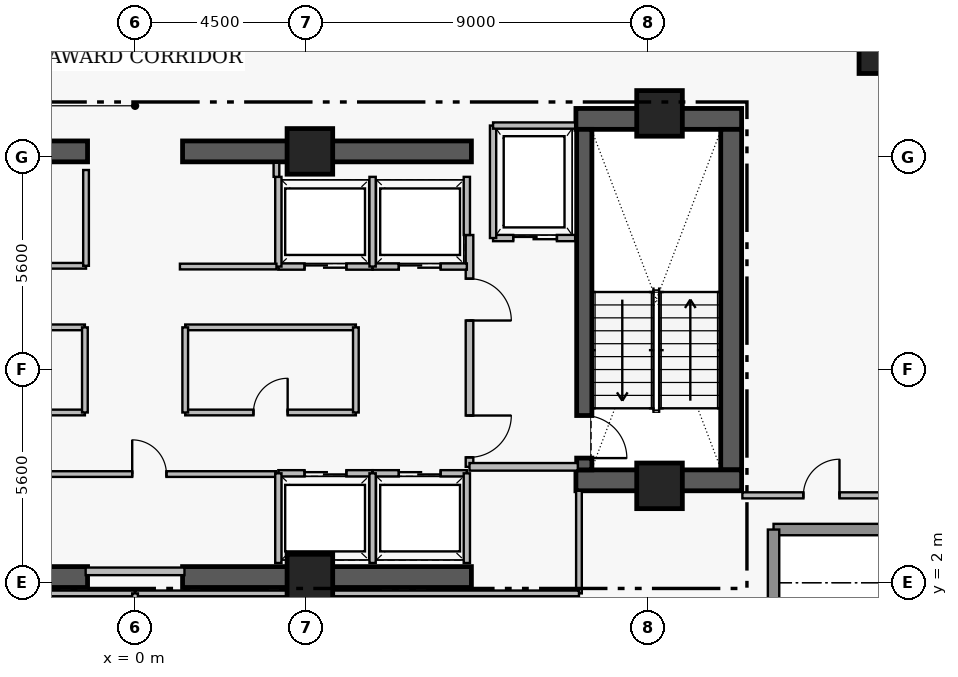
"""IFC4 building model, lengths in metres.
Left out: names, types, materials, properties, quantities, classifications, styles, units other than length and angle.
Written with IfcOpenShell. Run it as: python <this file> out.ifc"""

import sys

from ifc_helpers import new_model, si_unit, direction, frame, frame_2d, origin, origin_2d, place, context, subcontext, project, spatial, rectangle, extrude, element, fill, save


model = new_model("IFC4")
c1 = context("Model", 3, precision=1e-05, world=origin(), true_north=direction((0.0, 1.0)))
c2 = subcontext(c1, "Body", "Model", "MODEL_VIEW")
j1 = project(units=[si_unit("LENGTHUNIT", "METRE"), si_unit("PLANEANGLEUNIT", "RADIAN")], contexts=[c1])
p1 = place(None, origin())
s1 = spatial("IfcSite", under=j1, at=p1, CompositionType="ELEMENT")
p2 = place(p1, origin())
s2 = spatial("IfcBuilding", under=s1, at=p2, CompositionType="ELEMENT")
p3 = place(p2, frame((0.0, 0.0, 265.55)))
s3 = spatial("IfcBuildingStorey", under=s2, at=p3, CompositionType="ELEMENT", Elevation=265.55)
p4 = place(p3, frame((11.6, 14.205, 0.0), z_axis=(0.0, 0.0, 1.0), x_axis=(1.0, 0.0, 0.0)))
e1 = element("IfcWall", 1, at=p4, inside=s3, PredefinedType="SHEAR", context=c2, shape_type="SweptSolid", body=[
    extrude(rectangle(XDim=4.36, YDim=0.55, at=frame_2d((2.18, 0.0))), origin(), (0.0, 0.0, 1.0), 3.51),
])
p5 = place(p3, frame((15.685, 4.97, 0.0), z_axis=(0.0, 0.0, 1.0), x_axis=(0.0, 1.0, 0.0)))
e2 = element("IfcWall", 2, at=p5, inside=s3, PredefinedType="SHEAR", context=c2, shape_type="SweptSolid", body=[
    extrude(rectangle(XDim=8.96, YDim=0.55, at=frame_2d((4.48, 0.0))), origin(), (0.0, 0.0, 1.0), 3.51),
])
p6 = place(p3, frame((11.6, 4.695, 0.0), z_axis=(0.0, 0.0, 1.0), x_axis=(1.0, 0.0, 0.0)))
e3 = element("IfcWall", 3, at=p6, inside=s3, PredefinedType="SHEAR", context=c2, shape_type="SweptSolid", body=[
    extrude(rectangle(XDim=4.36, YDim=0.55, at=frame_2d((2.18, 0.0))), origin(), (0.0, 0.0, 1.0), 3.51),
])
for number, where, z_axis, x_axis in (
    (4, (-8.85, 2.15, 0.0), (0.0, 0.0, 1.0), (1.0, 0.0, 0.0)),
    (5, (1.25, 2.15, 0.0), (0.0, 0.0, 1.0), (1.0, 0.0, 0.0)),
    (6, (-8.85, 13.35, 0.0), (0.0, 0.0, 1.0), (1.0, 0.0, 0.0)),
    (7, (1.25, 13.35, 0.0), (0.0, 0.0, 1.0), (1.0, 0.0, 0.0)),
):
    element("IfcWall", number, at=place(p3, frame(where, z_axis=z_axis, x_axis=x_axis)), inside=s3, PredefinedType="SHEAR", context=c2, shape_type="SweptSolid", body=[
        extrude(rectangle(XDim=7.6, YDim=0.55, at=frame_2d((3.8, 0.0))), origin(), (0.0, 0.0, 1.0), 3.48),
    ])
p7 = place(p3, frame((11.82, 13.93, 0.0), z_axis=(0.0, 0.0, 1.0), x_axis=(0.0, -1.0, 0.0)))
e8 = element("IfcWall", 8, at=p7, inside=s3, PredefinedType="SHEAR", context=c2, shape_type="SweptSolid", body=[
    extrude(rectangle(XDim=8.96, YDim=0.4, at=frame_2d((4.48, 0.0))), origin(), (0.0, 0.0, 1.0), 3.51),
])
p8 = place(p7, frame((7.53, 0.0, 0.0)))
e9 = element("IfcOpeningElement", 9, at=p8, cuts=e8, PredefinedType="OPENING", context=c2, shape_type="SweptSolid", body=[
    extrude(rectangle(XDim=1.12, YDim=2.22, at=frame_2d((0.56, 1.11))), frame((0.0, 0.21, 0.0), z_axis=(0.0, -1.0, 0.0), x_axis=(1.0, 0.0, 0.0)), (0.0, 0.0, 1.0), 0.42),
])
for number, where, z_axis, x_axis in (
    (10, (4.6, 13.35, 0.0), (0.0, 0.0, 1.0), (1.0, 0.0, 0.0)),
    (11, (13.8, 14.35, 0.0), (0.0, 0.0, 1.0), (1.0, 0.0, 0.0)),
    (12, (4.6, 2.15, 0.0), (0.0, 0.0, 1.0), (1.0, 0.0, 0.0)),
    (13, (13.8, 4.55, 0.0), (0.0, 0.0, 1.0), (1.0, 0.0, 0.0)),
):
    element("IfcColumn", number, at=place(p3, frame(where, z_axis=z_axis, x_axis=x_axis)), inside=s3, PredefinedType="COLUMN", context=c2, shape_type="SweptSolid", body=[
        extrude(rectangle(XDim=1.2, YDim=1.2, at=origin_2d()), origin(), (0.0, 0.0, 1.0), 3.7),
    ])
p9 = place(p3, frame((19.55, 15.9, 0.0), z_axis=(0.0, 0.0, 1.0), x_axis=(1.0, 0.0, 0.0)))
e14 = element("IfcColumn", 14, at=p9, inside=s3, PredefinedType="COLUMN", context=c2, shape_type="SweptSolid", body=[
    extrude(rectangle(XDim=1.0, YDim=1.0, at=origin_2d()), origin(), (0.0, 0.0, 1.0), 3.7),
])
for number, where, z_axis, x_axis in (
    (15, (20.2, 3.4, 0.0), (0.0, 0.0, 1.0), (-1.0, 0.0, 0.0)),
    (16, (16.8, 3.4, 0.0), (0.0, 0.0, 1.0), (0.0, -1.0, 0.0)),
):
    element("IfcWall", number, at=place(p3, frame(where, z_axis=z_axis, x_axis=x_axis)), inside=s3, PredefinedType="STANDARD", context=c2, shape_type="SweptSolid", body=[
        extrude(rectangle(XDim=3.4, YDim=0.3, at=frame_2d((1.7, 0.0))), origin(), (0.0, 0.0, 1.0), 3.48),
    ])
p10 = place(p3, frame((8.8, 11.15, 0.0), z_axis=(0.0, 0.0, 1.0), x_axis=(0.0, -1.0, 0.0)))
e17 = element("IfcWall", 17, at=p10, inside=s3, PredefinedType="PARTITIONING", context=c2, shape_type="SweptSolid", body=[
    extrude(rectangle(XDim=6.1, YDim=0.2, at=frame_2d((3.05, 0.0))), origin(), (0.0, 0.0, 1.0), 3.48),
])
p11 = place(p10, frame((1.15, 0.0, 0.0)))
e18 = element("IfcOpeningElement", 18, at=p11, cuts=e17, PredefinedType="OPENING", context=c2, shape_type="SweptSolid", body=[
    extrude(rectangle(XDim=1.1, YDim=2.2, at=frame_2d((0.55, 1.1))), frame((0.0, 0.11, 0.0), z_axis=(0.0, -1.0, 0.0), x_axis=(1.0, 0.0, 0.0)), (0.0, 0.0, 1.0), 0.22),
])
p12 = place(p10, frame((4.75, 0.0, 0.0)))
e19 = element("IfcOpeningElement", 19, at=p12, cuts=e17, PredefinedType="OPENING", context=c2, shape_type="SweptSolid", body=[
    extrude(rectangle(XDim=1.1, YDim=2.2, at=frame_2d((0.55, 1.1))), frame((0.0, 0.11, 0.0), z_axis=(0.0, -1.0, 0.0), x_axis=(1.0, 0.0, 0.0)), (0.0, 0.0, 1.0), 0.22),
])
p13 = place(p3, frame((9.42, 11.07, 0.0), z_axis=(0.0, 0.0, 1.0), x_axis=(1.0, 0.0, 0.0)))
e20 = element("IfcWall", 20, at=p13, inside=s3, PredefinedType="PARTITIONING", context=c2, shape_type="SweptSolid", body=[
    extrude(rectangle(XDim=2.16, YDim=0.165, at=frame_2d((1.08, 0.0))), origin(), (0.0, 0.0, 1.0), 3.48),
])
p14 = place(p13, frame((0.53, 0.0, 0.0)))
e21 = element("IfcOpeningElement", 21, at=p14, cuts=e20, PredefinedType="OPENING", context=c2, shape_type="SweptSolid", body=[
    extrude(rectangle(XDim=1.15, YDim=2.25, at=frame_2d((0.575, 1.125))), frame((0.0, 0.093, 0.0), z_axis=(0.0, -1.0, 0.0), x_axis=(1.0, 0.0, 0.0)), (0.0, 0.0, 1.0), 0.185),
])
p15 = place(p3, frame((3.77, 4.88, 0.0), z_axis=(0.0, 0.0, 1.0), x_axis=(1.0, 0.0, 0.0)))
e22 = element("IfcWall", 22, at=p15, inside=s3, PredefinedType="PARTITIONING", context=c2, shape_type="SweptSolid", body=[
    extrude(rectangle(XDim=2.48, YDim=0.165, at=frame_2d((1.24, 0.0))), origin(), (0.0, 0.0, 1.0), 3.48),
])
p16 = place(p15, frame((0.69, 0.0, 0.0)))
e23 = element("IfcOpeningElement", 23, at=p16, cuts=e22, PredefinedType="OPENING", context=c2, shape_type="SweptSolid", body=[
    extrude(rectangle(XDim=1.1, YDim=2.25, at=frame_2d((0.55, 1.125))), frame((0.0, 0.093, 0.0), z_axis=(0.0, -1.0, 0.0), x_axis=(1.0, 0.0, 0.0)), (0.0, 0.0, 1.0), 0.185),
])
p17 = place(p3, frame((6.25, 4.88, 0.0), z_axis=(0.0, 0.0, 1.0), x_axis=(1.0, 0.0, 0.0)))
e24 = element("IfcWall", 24, at=p17, inside=s3, PredefinedType="PARTITIONING", context=c2, shape_type="SweptSolid", body=[
    extrude(rectangle(XDim=2.48, YDim=0.165, at=frame_2d((1.24, 0.0))), origin(), (0.0, 0.0, 1.0), 3.48),
])
p18 = place(p17, frame((0.69, 0.0, 0.0)))
e25 = element("IfcOpeningElement", 25, at=p18, cuts=e24, PredefinedType="OPENING", context=c2, shape_type="SweptSolid", body=[
    extrude(rectangle(XDim=1.1, YDim=2.25, at=frame_2d((0.55, 1.125))), frame((0.0, 0.093, 0.0), z_axis=(0.0, -1.0, 0.0), x_axis=(1.0, 0.0, 0.0)), (0.0, 0.0, 1.0), 0.185),
])
p19 = place(p3, frame((3.77, 10.32, 0.0), z_axis=(0.0, 0.0, 1.0), x_axis=(1.0, 0.0, 0.0)))
e26 = element("IfcWall", 26, at=p19, inside=s3, PredefinedType="PARTITIONING", context=c2, shape_type="SweptSolid", body=[
    extrude(rectangle(XDim=2.48, YDim=0.165, at=frame_2d((1.24, 0.0))), origin(), (0.0, 0.0, 1.0), 3.48),
])
p20 = place(p19, frame((0.69, 0.0, 0.0)))
e27 = element("IfcOpeningElement", 27, at=p20, cuts=e26, PredefinedType="OPENING", context=c2, shape_type="SweptSolid", body=[
    extrude(rectangle(XDim=1.1, YDim=2.25, at=frame_2d((0.55, 1.125))), frame((0.0, 0.093, 0.0), z_axis=(0.0, -1.0, 0.0), x_axis=(1.0, 0.0, 0.0)), (0.0, 0.0, 1.0), 0.185),
])
p21 = place(p3, frame((6.25, 10.32, 0.0), z_axis=(0.0, 0.0, 1.0), x_axis=(1.0, 0.0, 0.0)))
e28 = element("IfcWall", 28, at=p21, inside=s3, PredefinedType="PARTITIONING", context=c2, shape_type="SweptSolid", body=[
    extrude(rectangle(XDim=2.48, YDim=0.165, at=frame_2d((1.24, 0.0))), origin(), (0.0, 0.0, 1.0), 3.48),
])
p22 = place(p21, frame((0.69, 0.0, 0.0)))
e29 = element("IfcOpeningElement", 29, at=p22, cuts=e28, PredefinedType="OPENING", context=c2, shape_type="SweptSolid", body=[
    extrude(rectangle(XDim=1.1, YDim=2.25, at=frame_2d((0.55, 1.125))), frame((0.0, 0.093, 0.0), z_axis=(0.0, -1.0, 0.0), x_axis=(1.0, 0.0, 0.0)), (0.0, 0.0, 1.0), 0.185),
])
p23 = place(p3, frame((-2.96, 4.86, 0.0), z_axis=(0.0, 0.0, 1.0), x_axis=(1.0, 0.0, 0.0)))
e30 = element("IfcWall", 30, at=p23, inside=s3, PredefinedType="PARTITIONING", context=c2, shape_type="SweptSolid", body=[
    extrude(rectangle(XDim=6.67, YDim=0.15, at=frame_2d((3.335, 0.0))), origin(), (0.0, 0.0, 1.0), 3.48),
])
p24 = place(p23, frame((2.885, 0.0, 0.0)))
e31 = element("IfcOpeningElement", 31, at=p24, cuts=e30, PredefinedType="OPENING", context=c2, shape_type="SweptSolid", body=[
    extrude(rectangle(XDim=0.9, YDim=2.15, at=frame_2d((0.45, 1.075))), frame((0.0, 0.085, 0.0), z_axis=(0.0, -1.0, 0.0), x_axis=(1.0, 0.0, 0.0)), (0.0, 0.0, 1.0), 0.17),
])
p25 = place(p3, frame((-4.76, 10.34, 0.0), z_axis=(0.0, 0.0, 1.0), x_axis=(1.0, 0.0, 0.0)))
e32 = element("IfcWall", 32, at=p25, inside=s3, PredefinedType="PARTITIONING", context=c2, shape_type="SweptSolid", body=[
    extrude(rectangle(XDim=3.47, YDim=0.15, at=frame_2d((1.735, 0.0))), origin(), (0.0, 0.0, 1.0), 3.48),
])
p26 = place(p25, frame((1.285, 0.0, 0.0)))
e33 = element("IfcOpeningElement", 33, at=p26, cuts=e32, PredefinedType="OPENING", context=c2, shape_type="SweptSolid", body=[
    extrude(rectangle(XDim=0.9, YDim=2.15, at=frame_2d((0.45, 1.075))), frame((0.0, 0.085, 0.0), z_axis=(0.0, -1.0, 0.0), x_axis=(1.0, 0.0, 0.0)), (0.0, 0.0, 1.0), 0.17),
])
p27 = place(p3, frame((-4.93, 8.72, 0.0), z_axis=(0.0, 0.0, 1.0), x_axis=(1.0, 0.0, 0.0)))
e34 = element("IfcWall", 34, at=p27, inside=s3, PredefinedType="PARTITIONING", context=c2, shape_type="SweptSolid", body=[
    extrude(rectangle(XDim=3.61, YDim=0.15, at=frame_2d((1.805, 0.0))), origin(), (0.0, 0.0, 1.0), 3.48),
])
p28 = place(p27, frame((1.355, 0.0, 0.0)))
e35 = element("IfcOpeningElement", 35, at=p28, cuts=e34, PredefinedType="OPENING", context=c2, shape_type="SweptSolid", body=[
    extrude(rectangle(XDim=0.9, YDim=2.15, at=frame_2d((0.45, 1.075))), frame((0.0, 0.085, 0.0), z_axis=(0.0, -1.0, 0.0), x_axis=(1.0, 0.0, 0.0)), (0.0, 0.0, 1.0), 0.17),
])
p29 = place(p3, frame((1.32, 6.48, 0.0), z_axis=(0.0, 0.0, 1.0), x_axis=(1.0, 0.0, 0.0)))
e36 = element("IfcWall", 36, at=p29, inside=s3, PredefinedType="PARTITIONING", context=c2, shape_type="SweptSolid", body=[
    extrude(rectangle(XDim=4.49, YDim=0.15, at=frame_2d((2.245, 0.0))), origin(), (0.0, 0.0, 1.0), 3.48),
])
p30 = place(p29, frame((1.795, 0.0, 0.0)))
e37 = element("IfcOpeningElement", 37, at=p30, cuts=e36, PredefinedType="OPENING", context=c2, shape_type="SweptSolid", body=[
    extrude(rectangle(XDim=0.9, YDim=2.15, at=frame_2d((0.45, 1.075))), frame((0.0, 0.085, 0.0), z_axis=(0.0, -1.0, 0.0), x_axis=(1.0, 0.0, 0.0)), (0.0, 0.0, 1.0), 0.17),
])
p31 = place(p3, frame((15.98, 4.3, 0.0), z_axis=(0.0, 0.0, 1.0), x_axis=(1.0, 0.0, 0.0)))
e38 = element("IfcWall", 38, at=p31, inside=s3, PredefinedType="PARTITIONING", context=c2, shape_type="SweptSolid", body=[
    extrude(rectangle(XDim=4.16, YDim=0.16, at=frame_2d((2.08, 0.0))), origin(), (0.0, 0.0, 1.0), 3.48),
])
p32 = place(p31, frame((1.605, 0.0, 0.0)))
e39 = element("IfcOpeningElement", 39, at=p32, cuts=e38, PredefinedType="OPENING", context=c2, shape_type="SweptSolid", body=[
    extrude(rectangle(XDim=0.95, YDim=2.15, at=frame_2d((0.475, 1.075))), frame((0.0, 0.09, 0.0), z_axis=(0.0, -1.0, 0.0), x_axis=(1.0, 0.0, 0.0)), (0.0, 0.0, 1.0), 0.18),
])
p33 = place(p3, frame((8.8, 5.05, 0.0), z_axis=(0.0, 0.0, 1.0), x_axis=(1.0, 0.0, 0.0)))
e40 = element("IfcWall", 40, at=p33, inside=s3, PredefinedType="PARTITIONING", context=c2, shape_type="SweptSolid", body=[
    extrude(rectangle(XDim=2.85, YDim=0.2, at=frame_2d((1.425, 0.0))), origin(), (0.0, 0.0, 1.0), 3.48),
])
p34 = place(p3, frame((9.42, 11.07, 0.0), z_axis=(0.0, 0.0, 1.0), x_axis=(0.0, 1.0, 0.0)))
e41 = element("IfcWall", 41, at=p34, inside=s3, PredefinedType="PARTITIONING", context=c2, shape_type="SweptSolid", body=[
    extrude(rectangle(XDim=2.96, YDim=0.165, at=frame_2d((1.48, 0.0))), origin(), (0.0, 0.0, 1.0), 3.48),
])
p35 = place(p3, frame((9.42, 14.03, 0.0), z_axis=(0.0, 0.0, 1.0), x_axis=(1.0, 0.0, 0.0)))
e42 = element("IfcWall", 42, at=p35, inside=s3, PredefinedType="PARTITIONING", context=c2, shape_type="SweptSolid", body=[
    extrude(rectangle(XDim=2.16, YDim=0.165, at=frame_2d((1.08, 0.0))), origin(), (0.0, 0.0, 1.0), 3.48),
])
for number, where, z_axis, x_axis in (
    (43, (3.77, 2.52, 0.0), (0.0, 0.0, 1.0), (0.0, 1.0, 0.0)),
    (44, (6.25, 2.52, 0.0), (0.0, 0.0, 1.0), (0.0, 1.0, 0.0)),
    (45, (8.73, 2.52, 0.0), (0.0, 0.0, 1.0), (0.0, 1.0, 0.0)),
    (46, (3.77, 10.32, 0.0), (0.0, 0.0, 1.0), (0.0, 1.0, 0.0)),
    (47, (6.25, 10.32, 0.0), (0.0, 0.0, 1.0), (0.0, 1.0, 0.0)),
):
    element("IfcWall", number, at=place(p3, frame(where, z_axis=z_axis, x_axis=x_axis)), inside=s3, PredefinedType="PARTITIONING", context=c2, shape_type="SweptSolid", body=[
        extrude(rectangle(XDim=2.36, YDim=0.165, at=frame_2d((1.18, 0.0))), origin(), (0.0, 0.0, 1.0), 3.48),
    ])
p36 = place(p3, frame((8.73, 11.15, 0.0), z_axis=(0.0, 0.0, 1.0), x_axis=(0.0, 1.0, 0.0)))
e48 = element("IfcWall", 48, at=p36, inside=s3, PredefinedType="PARTITIONING", context=c2, shape_type="SweptSolid", body=[
    extrude(rectangle(XDim=1.53, YDim=0.165, at=frame_2d((0.765, 0.0))), origin(), (0.0, 0.0, 1.0), 3.48),
])
p37 = place(p3, frame((-1.3, 2.3, 0.0), z_axis=(0.0, 0.0, 1.0), x_axis=(1.0, 0.0, 0.0)))
e49 = element("IfcWall", 49, at=p37, inside=s3, PredefinedType="PARTITIONING", context=c2, shape_type="SweptSolid", body=[
    extrude(rectangle(XDim=2.6, YDim=0.2, at=frame_2d((1.3, 0.0))), origin(), (0.0, 0.0, 1.0), 2.38),
])
p38 = place(p3, frame((-1.29, 10.34, 0.0), z_axis=(0.0, 0.0, 1.0), x_axis=(0.0, 1.0, 0.0)))
e50 = element("IfcWall", 50, at=p38, inside=s3, PredefinedType="PARTITIONING", context=c2, shape_type="SweptSolid", body=[
    extrude(rectangle(XDim=2.52, YDim=0.15, at=frame_2d((1.26, 0.0))), origin(), (0.0, 0.0, 1.0), 3.48),
])
p39 = place(p3, frame((-4.93, 6.48, 0.0), z_axis=(0.0, 0.0, 1.0), x_axis=(1.0, 0.0, 0.0)))
e51 = element("IfcWall", 51, at=p39, inside=s3, PredefinedType="PARTITIONING", context=c2, shape_type="SweptSolid", body=[
    extrude(rectangle(XDim=3.61, YDim=0.15, at=frame_2d((1.805, 0.0))), origin(), (0.0, 0.0, 1.0), 3.48),
])
p40 = place(p3, frame((-1.32, 6.48, 0.0), z_axis=(0.0, 0.0, 1.0), x_axis=(0.0, 1.0, 0.0)))
e52 = element("IfcWall", 52, at=p40, inside=s3, PredefinedType="PARTITIONING", context=c2, shape_type="SweptSolid", body=[
    extrude(rectangle(XDim=2.24, YDim=0.15, at=frame_2d((1.12, 0.0))), origin(), (0.0, 0.0, 1.0), 3.48),
])
p41 = place(p3, frame((1.32, 8.72, 0.0), z_axis=(0.0, 0.0, 1.0), x_axis=(1.0, 0.0, 0.0)))
e53 = element("IfcWall", 53, at=p41, inside=s3, PredefinedType="PARTITIONING", context=c2, shape_type="SweptSolid", body=[
    extrude(rectangle(XDim=4.49, YDim=0.15, at=frame_2d((2.245, 0.0))), origin(), (0.0, 0.0, 1.0), 3.48),
])
for number, where, z_axis, x_axis in (
    (54, (1.32, 6.48, 0.0), (0.0, 0.0, 1.0), (0.0, 1.0, 0.0)),
    (55, (5.81, 6.48, 0.0), (0.0, 0.0, 1.0), (0.0, 1.0, 0.0)),
):
    element("IfcWall", number, at=place(p3, frame(where, z_axis=z_axis, x_axis=x_axis)), inside=s3, PredefinedType="PARTITIONING", context=c2, shape_type="SweptSolid", body=[
        extrude(rectangle(XDim=2.24, YDim=0.15, at=frame_2d((1.12, 0.0))), origin(), (0.0, 0.0, 1.0), 3.48),
    ])
p42 = place(p3, frame((1.18, 10.32, 0.0), z_axis=(0.0, 0.0, 1.0), x_axis=(1.0, 0.0, 0.0)))
e56 = element("IfcWall", 56, at=p42, inside=s3, PredefinedType="PARTITIONING", context=c2, shape_type="SweptSolid", body=[
    extrude(rectangle(XDim=2.54, YDim=0.15, at=frame_2d((1.27, 0.0))), origin(), (0.0, 0.0, 1.0), 3.48),
])
p43 = place(p3, frame((3.72, 12.68, 0.0), z_axis=(0.0, 0.0, 1.0), x_axis=(0.0, 1.0, 0.0)))
e57 = element("IfcWall", 57, at=p43, inside=s3, PredefinedType="PARTITIONING", context=c2, shape_type="SweptSolid", body=[
    extrude(rectangle(XDim=0.37, YDim=0.15, at=frame_2d((0.185, 0.0))), origin(), (0.0, 0.0, 1.0), 3.48),
])
p44 = place(p3, frame((-11.68, 1.72, 0.0), z_axis=(0.0, 0.0, 1.0), x_axis=(1.0, 0.0, 0.0)))
e58 = element("IfcWall", 58, at=p44, inside=s3, PredefinedType="PARTITIONING", context=c2, shape_type="SweptSolid", body=[
    extrude(rectangle(XDim=11.68, YDim=0.15, at=frame_2d((5.84, 0.0))), origin(), (0.0, 0.0, 1.0), 2.38),
])
p45 = place(p3, frame((11.68, 1.72, 0.0), z_axis=(0.0, 0.0, 1.0), x_axis=(0.0, 1.0, 0.0)))
e59 = element("IfcWall", 59, at=p45, inside=s3, PredefinedType="PARTITIONING", context=c2, shape_type="SweptSolid", body=[
    extrude(rectangle(XDim=2.7, YDim=0.15, at=frame_2d((1.35, 0.0))), origin(), (0.0, 0.0, 1.0), 3.48),
])
p46 = place(p3, frame((0.0, 1.72, 0.0), z_axis=(0.0, 0.0, 1.0), x_axis=(1.0, 0.0, 0.0)))
e60 = element("IfcWall", 60, at=p46, inside=s3, PredefinedType="PARTITIONING", context=c2, shape_type="SweptSolid", body=[
    extrude(rectangle(XDim=11.68, YDim=0.15, at=frame_2d((5.84, 0.0))), origin(), (0.0, 0.0, 1.0), 2.38),
])
p47 = place(p3, frame((0.0, 0.06, 0.0), z_axis=(0.0, 0.0, 1.0), x_axis=(0.0, 1.0, 0.0)))
e61 = element("IfcWall", 61, at=p47, inside=s3, PredefinedType="PARTITIONING", context=c2, shape_type="SweptSolid", body=[
    extrude(rectangle(XDim=1.66, YDim=0.15, at=frame_2d((0.83, 0.0))), origin(), (0.0, 0.0, 1.0), 3.48),
])
p48 = place(p8, origin())
e62 = element("IfcDoor", 62, at=p48, inside=s3, OperationType="SINGLE_SWING_RIGHT", PredefinedType="DOOR", context=c2, shape_type="SweptSolid", body=[
    extrude(rectangle(XDim=1.12, YDim=2.22, at=frame_2d((0.56, 1.11))), frame((0.0, 0.025, 0.0), z_axis=(0.0, -1.0, 0.0), x_axis=(1.0, 0.0, 0.0)), (0.0, 0.0, 1.0), 0.05),
])
fill(e9, e62)
p49 = place(p11, origin())
e63 = element("IfcDoor", 63, at=p49, inside=s3, OperationType="SINGLE_SWING_RIGHT", PredefinedType="DOOR", context=c2, shape_type="SweptSolid", body=[
    extrude(rectangle(XDim=1.1, YDim=2.2, at=frame_2d((0.55, 1.1))), frame((0.0, 0.025, 0.0), z_axis=(0.0, -1.0, 0.0), x_axis=(1.0, 0.0, 0.0)), (0.0, 0.0, 1.0), 0.05),
])
fill(e18, e63)
p50 = place(p12, origin())
e64 = element("IfcDoor", 64, at=p50, inside=s3, OperationType="SINGLE_SWING_LEFT", PredefinedType="DOOR", context=c2, shape_type="SweptSolid", body=[
    extrude(rectangle(XDim=1.1, YDim=2.2, at=frame_2d((0.55, 1.1))), frame((0.0, 0.025, 0.0), z_axis=(0.0, -1.0, 0.0), x_axis=(1.0, 0.0, 0.0)), (0.0, 0.0, 1.0), 0.05),
])
fill(e19, e64)
p51 = place(p14, origin())
e65 = element("IfcDoor", 65, at=p51, inside=s3, OperationType="SLIDING_TO_LEFT", PredefinedType="DOOR", context=c2, shape_type="SweptSolid", body=[
    extrude(rectangle(XDim=1.15, YDim=2.25, at=frame_2d((0.575, 1.125))), frame((0.0, 0.025, 0.0), z_axis=(0.0, -1.0, 0.0), x_axis=(1.0, 0.0, 0.0)), (0.0, 0.0, 1.0), 0.05),
])
fill(e21, e65)
p52 = place(p16, origin())
e66 = element("IfcDoor", 66, at=p52, inside=s3, OperationType="SLIDING_TO_LEFT", PredefinedType="DOOR", context=c2, shape_type="SweptSolid", body=[
    extrude(rectangle(XDim=1.1, YDim=2.25, at=frame_2d((0.55, 1.125))), frame((0.0, 0.025, 0.0), z_axis=(0.0, -1.0, 0.0), x_axis=(1.0, 0.0, 0.0)), (0.0, 0.0, 1.0), 0.05),
])
fill(e23, e66)
p53 = place(p18, origin())
e67 = element("IfcDoor", 67, at=p53, inside=s3, OperationType="SLIDING_TO_LEFT", PredefinedType="DOOR", context=c2, shape_type="SweptSolid", body=[
    extrude(rectangle(XDim=1.1, YDim=2.25, at=frame_2d((0.55, 1.125))), frame((0.0, 0.025, 0.0), z_axis=(0.0, -1.0, 0.0), x_axis=(1.0, 0.0, 0.0)), (0.0, 0.0, 1.0), 0.05),
])
fill(e25, e67)
p54 = place(p20, origin())
e68 = element("IfcDoor", 68, at=p54, inside=s3, OperationType="SLIDING_TO_LEFT", PredefinedType="DOOR", context=c2, shape_type="SweptSolid", body=[
    extrude(rectangle(XDim=1.1, YDim=2.25, at=frame_2d((0.55, 1.125))), frame((0.0, 0.025, 0.0), z_axis=(0.0, -1.0, 0.0), x_axis=(1.0, 0.0, 0.0)), (0.0, 0.0, 1.0), 0.05),
])
fill(e27, e68)
p55 = place(p22, origin())
e69 = element("IfcDoor", 69, at=p55, inside=s3, OperationType="SLIDING_TO_LEFT", PredefinedType="DOOR", context=c2, shape_type="SweptSolid", body=[
    extrude(rectangle(XDim=1.1, YDim=2.25, at=frame_2d((0.55, 1.125))), frame((0.0, 0.025, 0.0), z_axis=(0.0, -1.0, 0.0), x_axis=(1.0, 0.0, 0.0)), (0.0, 0.0, 1.0), 0.05),
])
fill(e29, e69)
p56 = place(p24, origin())
e70 = element("IfcDoor", 70, at=p56, inside=s3, OperationType="SINGLE_SWING_LEFT", PredefinedType="DOOR", context=c2, shape_type="SweptSolid", body=[
    extrude(rectangle(XDim=0.9, YDim=2.15, at=frame_2d((0.45, 1.075))), frame((0.0, 0.025, 0.0), z_axis=(0.0, -1.0, 0.0), x_axis=(1.0, 0.0, 0.0)), (0.0, 0.0, 1.0), 0.05),
])
fill(e31, e70)
p57 = place(p30, origin())
e71 = element("IfcDoor", 71, at=p57, inside=s3, OperationType="SINGLE_SWING_RIGHT", PredefinedType="DOOR", context=c2, shape_type="SweptSolid", body=[
    extrude(rectangle(XDim=0.9, YDim=2.15, at=frame_2d((0.45, 1.075))), frame((0.0, 0.025, 0.0), z_axis=(0.0, -1.0, 0.0), x_axis=(1.0, 0.0, 0.0)), (0.0, 0.0, 1.0), 0.05),
])
fill(e37, e71)
p58 = place(p32, origin())
e72 = element("IfcDoor", 72, at=p58, inside=s3, OperationType="SINGLE_SWING_RIGHT", PredefinedType="DOOR", context=c2, shape_type="SweptSolid", body=[
    extrude(rectangle(XDim=0.95, YDim=2.15, at=frame_2d((0.475, 1.075))), frame((0.0, 0.025, 0.0), z_axis=(0.0, -1.0, 0.0), x_axis=(1.0, 0.0, 0.0)), (0.0, 0.0, 1.0), 0.05),
])
fill(e39, e72)
save(model, sys.argv[1])
